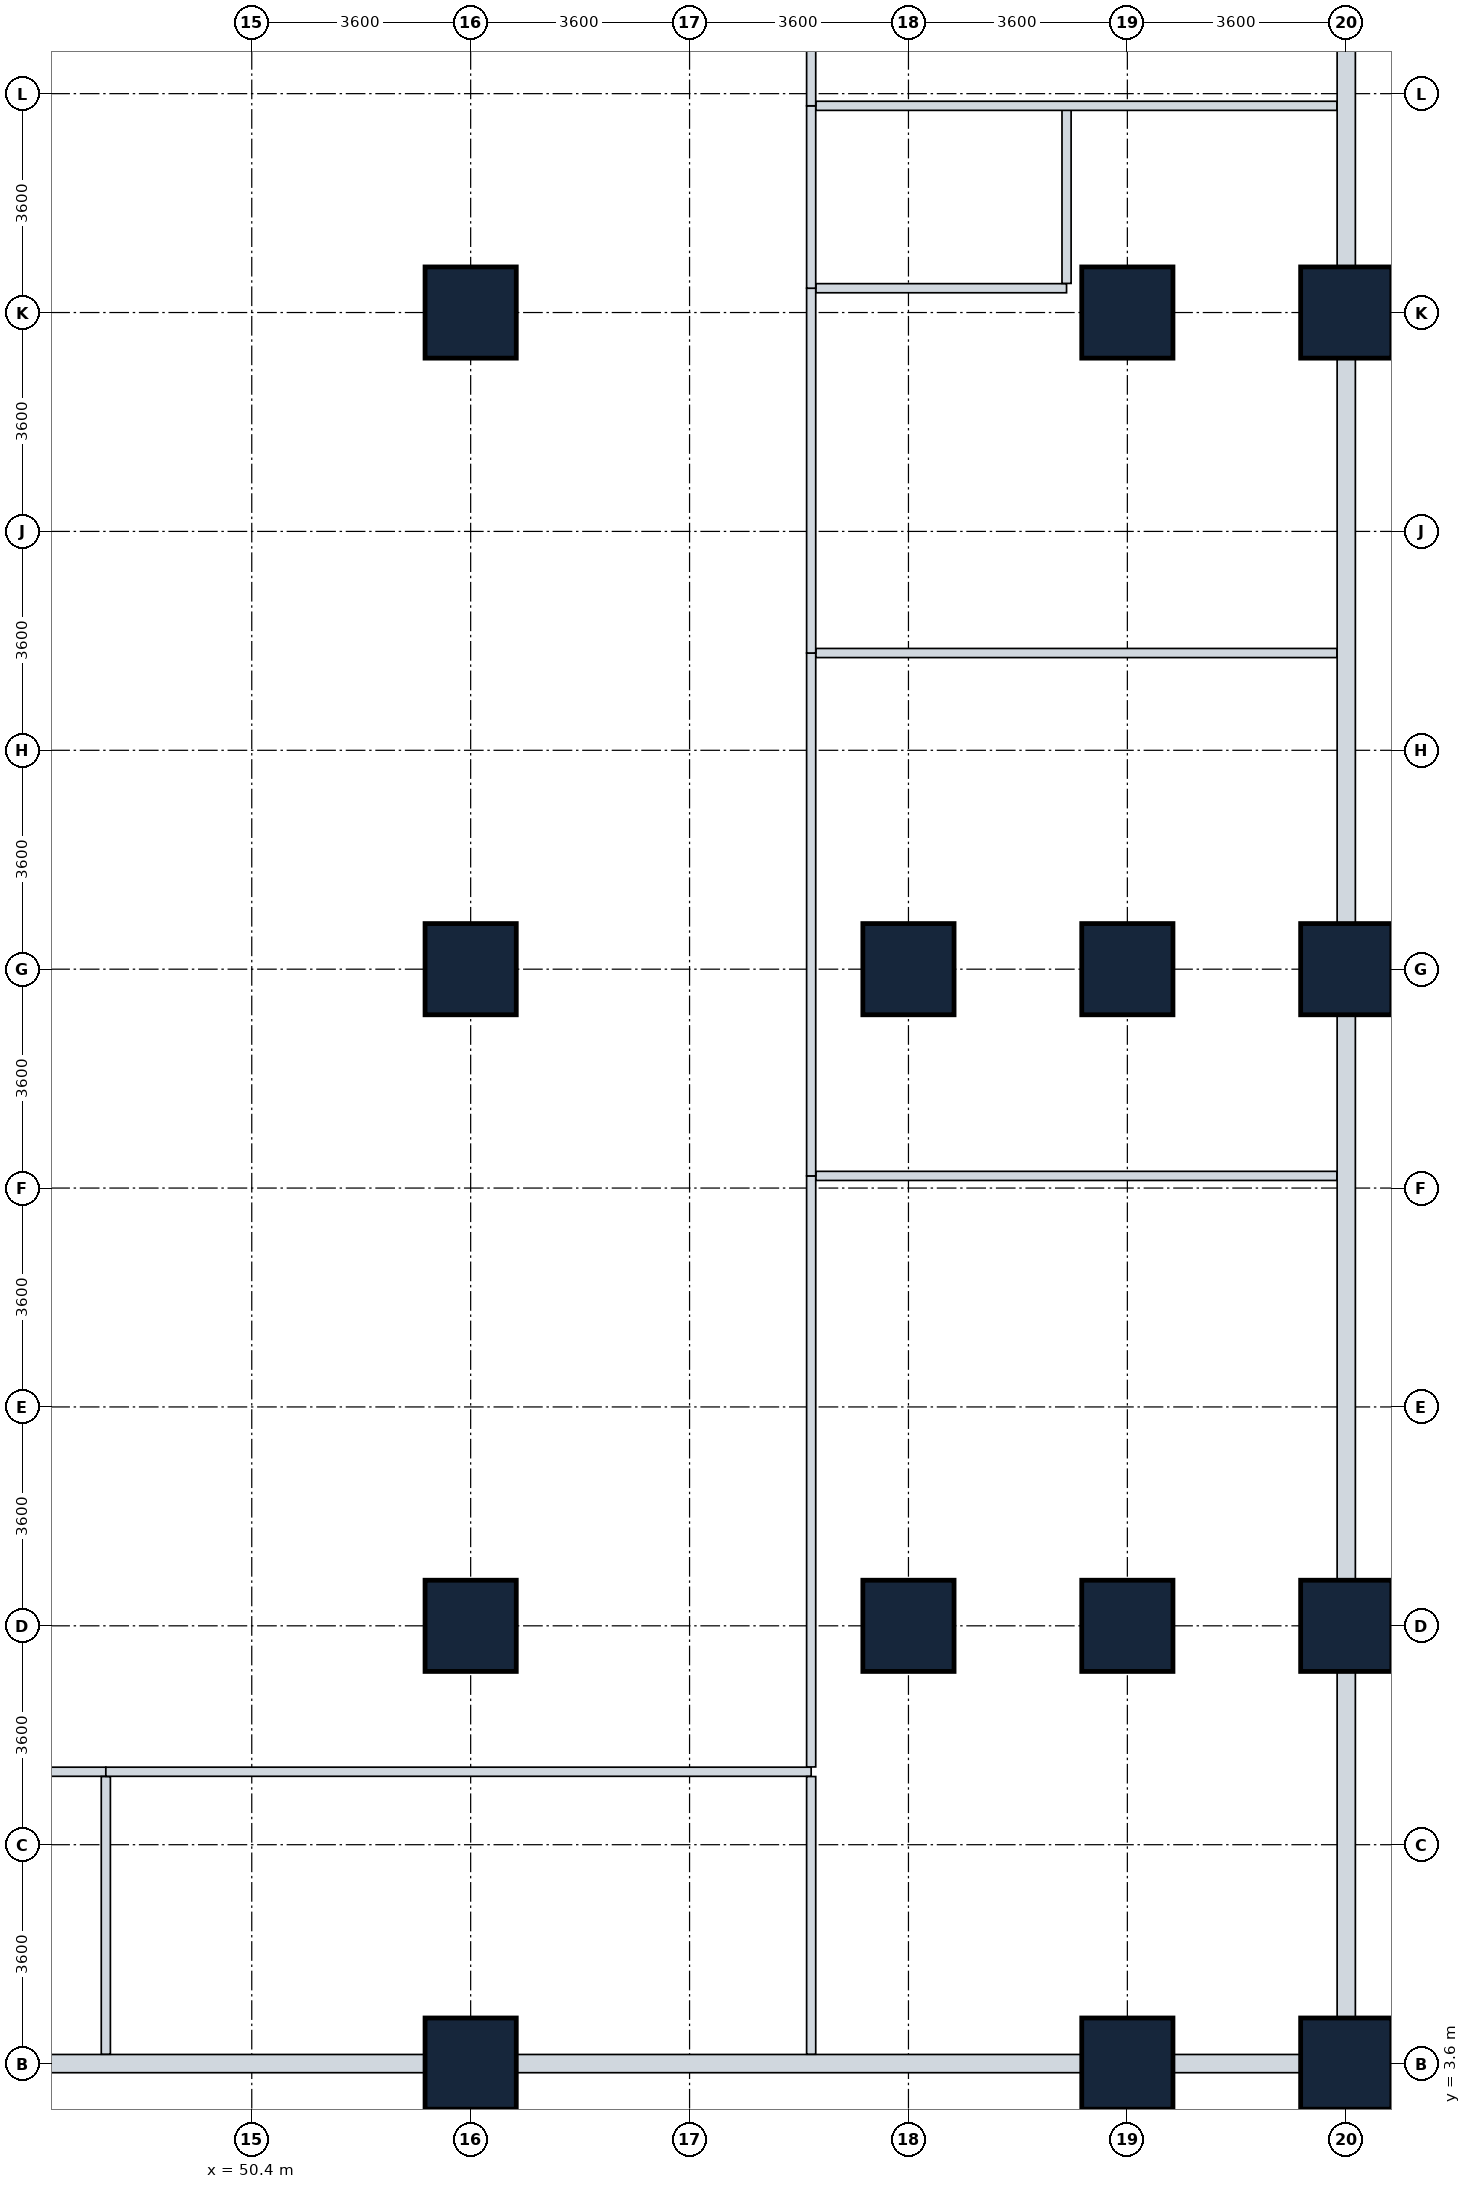
"""IFC4 building model, lengths in metres.
Left out: names, types, materials, properties, quantities, classifications, styles, units other than length and angle.
Written with IfcOpenShell. Run it as: python <this file> out.ifc"""

import sys

from ifc_helpers import new_model, si_unit, direction, frame, frame_2d, origin, origin_2d, place, context, subcontext, project, spatial, rectangle, extrude, element, fill, save


model = new_model("IFC4")
c1 = context("Model", 3, precision=1e-05, world=origin(), true_north=direction((0.0, 1.0)))
c2 = subcontext(c1, "Body", "Model", "MODEL_VIEW")
j1 = project(units=[si_unit("LENGTHUNIT", "METRE"), si_unit("PLANEANGLEUNIT", "RADIAN")], contexts=[c1])
p1 = place(None, origin())
s1 = spatial("IfcSite", under=j1, at=p1, CompositionType="ELEMENT")
p2 = place(p1, origin())
s2 = spatial("IfcBuilding", under=s1, at=p2, CompositionType="ELEMENT")
p3 = place(p2, frame((0.0, 0.0, 19.4)))
s3 = spatial("IfcBuildingStorey", under=s2, at=p3, CompositionType="ELEMENT", Elevation=19.4)
for number, where, z_axis, x_axis in (
    (1, (54.0, 3.6, 0.0), (0.0, 0.0, 1.0), (1.0, 0.0, 0.0)),
    (2, (54.0, 10.8, 0.0), (0.0, 0.0, 1.0), (1.0, 0.0, 0.0)),
    (3, (54.0, 21.6, 0.0), (0.0, 0.0, 1.0), (1.0, 0.0, 0.0)),
    (4, (54.0, 32.4, 0.0), (0.0, 0.0, 1.0), (1.0, 0.0, 0.0)),
    (5, (61.2, 10.8, 0.0), (0.0, 0.0, 1.0), (1.0, 0.0, 0.0)),
    (6, (61.2, 21.6, 0.0), (0.0, 0.0, 1.0), (1.0, 0.0, 0.0)),
    (7, (64.8, 3.6, 0.0), (0.0, 0.0, 1.0), (1.0, 0.0, 0.0)),
    (8, (64.8, 10.8, 0.0), (0.0, 0.0, 1.0), (1.0, 0.0, 0.0)),
    (9, (64.8, 21.6, 0.0), (0.0, 0.0, 1.0), (1.0, 0.0, 0.0)),
    (10, (64.8, 32.4, 0.0), (0.0, 0.0, 1.0), (1.0, 0.0, 0.0)),
    (11, (68.4, 3.6, 0.0), (0.0, 0.0, 1.0), (1.0, 0.0, 0.0)),
    (12, (68.4, 10.8, 0.0), (0.0, 0.0, 1.0), (1.0, 0.0, 0.0)),
    (13, (68.4, 21.6, 0.0), (0.0, 0.0, 1.0), (1.0, 0.0, 0.0)),
    (14, (68.4, 32.4, 0.0), (0.0, 0.0, 1.0), (1.0, 0.0, 0.0)),
):
    element("IfcColumn", number, at=place(p3, frame(where, z_axis=z_axis, x_axis=x_axis)), inside=s3, PredefinedType="COLUMN", context=c2, shape_type="SweptSolid", body=[
        extrude(rectangle(XDim=1.5, YDim=1.5, at=origin_2d()), origin(), (0.0, 0.0, 1.0), 4.6),
    ])
for number, where, z_axis, x_axis in (
    (15, (54.0, 3.6, 0.0), (0.0, 0.0, 1.0), (-1.0, 0.0, 0.0)),
    (16, (64.8, 3.6, 0.0), (0.0, 0.0, 1.0), (-1.0, 0.0, 0.0)),
):
    element("IfcWall", number, at=place(p3, frame(where, z_axis=z_axis, x_axis=x_axis)), inside=s3, PredefinedType="STANDARD", context=c2, shape_type="SweptSolid", body=[
        extrude(rectangle(XDim=10.8, YDim=0.3, at=frame_2d((5.4, 0.0))), origin(), (0.0, 0.0, 1.0), 3.23),
    ])
p4 = place(p3, frame((68.4, 3.6, 0.0), z_axis=(0.0, 0.0, 1.0), x_axis=(-1.0, 0.0, 0.0)))
e17 = element("IfcWall", 17, at=p4, inside=s3, PredefinedType="STANDARD", context=c2, shape_type="SweptSolid", body=[
    extrude(rectangle(XDim=3.6, YDim=0.3, at=frame_2d((1.8, 0.0))), origin(), (0.0, 0.0, 1.0), 3.23),
])
p5 = place(p3, frame((68.4, 10.8, 0.0), z_axis=(0.0, 0.0, 1.0), x_axis=(0.0, -1.0, 0.0)))
e18 = element("IfcWall", 18, at=p5, inside=s3, PredefinedType="STANDARD", context=c2, shape_type="SweptSolid", body=[
    extrude(rectangle(XDim=7.2, YDim=0.3, at=frame_2d((3.6, 0.0))), origin(), (0.0, 0.0, 1.0), 4.185),
])
p6 = place(p5, frame((2.4, 0.0, 0.85)))
e19 = element("IfcOpeningElement", 19, at=p6, cuts=e18, PredefinedType="OPENING", context=c2, shape_type="SweptSolid", body=[
    extrude(rectangle(XDim=2.4, YDim=1.6, at=frame_2d((1.2, 0.8))), frame((0.0, 0.16, 0.0), z_axis=(0.0, -1.0, 0.0), x_axis=(1.0, 0.0, 0.0)), (0.0, 0.0, 1.0), 0.32),
])
p7 = place(p3, frame((68.4, 21.6, 0.0), z_axis=(0.0, 0.0, 1.0), x_axis=(0.0, -1.0, 0.0)))
e20 = element("IfcWall", 20, at=p7, inside=s3, PredefinedType="STANDARD", context=c2, shape_type="SweptSolid", body=[
    extrude(rectangle(XDim=10.8, YDim=0.3, at=frame_2d((5.4, 0.0))), origin(), (0.0, 0.0, 1.0), 4.185),
])
p8 = place(p7, frame((4.6, 0.0, 0.0)))
e21 = element("IfcOpeningElement", 21, at=p8, cuts=e20, PredefinedType="OPENING", context=c2, shape_type="SweptSolid", body=[
    extrude(rectangle(XDim=1.6, YDim=2.1, at=frame_2d((0.8, 1.05))), frame((0.0, 0.16, 0.0), z_axis=(0.0, -1.0, 0.0), x_axis=(1.0, 0.0, 0.0)), (0.0, 0.0, 1.0), 0.32),
])
p9 = place(p3, frame((68.4, 32.4, 0.0), z_axis=(0.0, 0.0, 1.0), x_axis=(0.0, -1.0, 0.0)))
e22 = element("IfcWall", 22, at=p9, inside=s3, PredefinedType="STANDARD", context=c2, shape_type="SweptSolid", body=[
    extrude(rectangle(XDim=10.8, YDim=0.3, at=frame_2d((5.4, 0.0))), origin(), (0.0, 0.0, 1.0), 4.185),
])
p10 = place(p3, frame((68.4, 43.2, 0.0), z_axis=(0.0, 0.0, 1.0), x_axis=(0.0, -1.0, 0.0)))
e23 = element("IfcWall", 23, at=p10, inside=s3, PredefinedType="STANDARD", context=c2, shape_type="SweptSolid", body=[
    extrude(rectangle(XDim=10.8, YDim=0.3, at=frame_2d((5.4, 0.0))), origin(), (0.0, 0.0, 1.0), 4.185),
])
p11 = place(p10, frame((4.2, 0.0, 0.85)))
e24 = element("IfcOpeningElement", 24, at=p11, cuts=e23, PredefinedType="OPENING", context=c2, shape_type="SweptSolid", body=[
    extrude(rectangle(XDim=2.4, YDim=1.6, at=frame_2d((1.2, 0.8))), frame((0.0, 0.16, 0.0), z_axis=(0.0, -1.0, 0.0), x_axis=(1.0, 0.0, 0.0)), (0.0, 0.0, 1.0), 0.32),
])
p12 = place(p3, frame((30.0, 8.4, 0.0), z_axis=(0.0, 0.0, 1.0), x_axis=(1.0, 0.0, 0.0)))
e25 = element("IfcWall", 25, at=p12, inside=s3, PredefinedType="PARTITIONING", context=c2, shape_type="SweptSolid", body=[
    extrude(rectangle(XDim=18.0, YDim=0.15, at=frame_2d((9.0, 0.0))), origin(), (0.0, 0.0, 1.0), 3.23),
])
p13 = place(p12, frame((8.2, 0.0, 0.0)))
e26 = element("IfcOpeningElement", 26, at=p13, cuts=e25, PredefinedType="OPENING", context=c2, shape_type="SweptSolid", body=[
    extrude(rectangle(XDim=1.6, YDim=2.2, at=frame_2d((0.8, 1.1))), frame((0.0, 0.085, 0.0), z_axis=(0.0, -1.0, 0.0), x_axis=(1.0, 0.0, 0.0)), (0.0, 0.0, 1.0), 0.17),
])
p14 = place(p3, frame((48.0, 3.754, 0.0), z_axis=(0.0, 0.0, 1.0), x_axis=(0.0, 1.0, 0.0)))
e27 = element("IfcWall", 27, at=p14, inside=s3, PredefinedType="PARTITIONING", context=c2, shape_type="SweptSolid", body=[
    extrude(rectangle(XDim=4.567, YDim=0.15, at=frame_2d((2.284, 0.0))), origin(), (0.0, 0.0, 1.0), 3.23),
])
p15 = place(p3, frame((48.0, 8.4, 0.0), z_axis=(0.0, 0.0, 1.0), x_axis=(1.0, 0.0, 0.0)))
e28 = element("IfcWall", 28, at=p15, inside=s3, PredefinedType="PARTITIONING", context=c2, shape_type="SweptSolid", body=[
    extrude(rectangle(XDim=11.6, YDim=0.15, at=frame_2d((5.8, 0.0))), origin(), (0.0, 0.0, 1.0), 3.23),
])
p16 = place(p15, frame((2.212, 0.0, 0.0)))
e29 = element("IfcOpeningElement", 29, at=p16, cuts=e28, PredefinedType="OPENING", context=c2, shape_type="SweptSolid", body=[
    extrude(rectangle(XDim=1.6, YDim=2.2, at=frame_2d((0.8, 1.1))), frame((0.0, 0.085, 0.0), z_axis=(0.0, -1.0, 0.0), x_axis=(1.0, 0.0, 0.0)), (0.0, 0.0, 1.0), 0.17),
])
p17 = place(p3, frame((59.6, 3.754, 0.0), z_axis=(0.0, 0.0, 1.0), x_axis=(0.0, 1.0, 0.0)))
e30 = element("IfcWall", 30, at=p17, inside=s3, PredefinedType="PARTITIONING", context=c2, shape_type="SweptSolid", body=[
    extrude(rectangle(XDim=4.567, YDim=0.15, at=frame_2d((2.284, 0.0))), origin(), (0.0, 0.0, 1.0), 3.23),
])
p18 = place(p3, frame((59.6, 8.479, 0.0), z_axis=(0.0, 0.0, 1.0), x_axis=(0.0, 1.0, 0.0)))
e31 = element("IfcWall", 31, at=p18, inside=s3, PredefinedType="PARTITIONING", context=c2, shape_type="SweptSolid", body=[
    extrude(rectangle(XDim=9.721, YDim=0.15, at=frame_2d((4.86, 0.0))), origin(), (0.0, 0.0, 1.0), 3.23),
])
p19 = place(p18, frame((4.941, 0.0, 0.0)))
e32 = element("IfcOpeningElement", 32, at=p19, cuts=e31, PredefinedType="OPENING", context=c2, shape_type="SweptSolid", body=[
    extrude(rectangle(XDim=1.6, YDim=2.2, at=frame_2d((0.8, 1.1))), frame((0.0, 0.085, 0.0), z_axis=(0.0, -1.0, 0.0), x_axis=(1.0, 0.0, 0.0)), (0.0, 0.0, 1.0), 0.17),
])
p20 = place(p3, frame((59.679, 18.2, 0.0), z_axis=(0.0, 0.0, 1.0), x_axis=(1.0, 0.0, 0.0)))
e33 = element("IfcWall", 33, at=p20, inside=s3, PredefinedType="PARTITIONING", context=c2, shape_type="SweptSolid", body=[
    extrude(rectangle(XDim=8.567, YDim=0.15, at=frame_2d((4.284, 0.0))), origin(), (0.0, 0.0, 1.0), 3.23),
])
p21 = place(p3, frame((59.6, 18.2, 0.0), z_axis=(0.0, 0.0, 1.0), x_axis=(0.0, 1.0, 0.0)))
e34 = element("IfcWall", 34, at=p21, inside=s3, PredefinedType="PARTITIONING", context=c2, shape_type="SweptSolid", body=[
    extrude(rectangle(XDim=8.6, YDim=0.15, at=frame_2d((4.3, 0.0))), origin(), (0.0, 0.0, 1.0), 3.23),
])
p22 = place(p21, frame((6.067, 0.0, 0.0)))
e35 = element("IfcOpeningElement", 35, at=p22, cuts=e34, PredefinedType="OPENING", context=c2, shape_type="SweptSolid", body=[
    extrude(rectangle(XDim=1.6, YDim=2.2, at=frame_2d((0.8, 1.1))), frame((0.0, 0.085, 0.0), z_axis=(0.0, -1.0, 0.0), x_axis=(1.0, 0.0, 0.0)), (0.0, 0.0, 1.0), 0.17),
])
p23 = place(p3, frame((59.679, 26.8, 0.0), z_axis=(0.0, 0.0, 1.0), x_axis=(1.0, 0.0, 0.0)))
e36 = element("IfcWall", 36, at=p23, inside=s3, PredefinedType="PARTITIONING", context=c2, shape_type="SweptSolid", body=[
    extrude(rectangle(XDim=8.567, YDim=0.15, at=frame_2d((4.284, 0.0))), origin(), (0.0, 0.0, 1.0), 3.23),
])
p24 = place(p3, frame((59.6, 26.8, 0.0), z_axis=(0.0, 0.0, 1.0), x_axis=(0.0, 1.0, 0.0)))
e37 = element("IfcWall", 37, at=p24, inside=s3, PredefinedType="PARTITIONING", context=c2, shape_type="SweptSolid", body=[
    extrude(rectangle(XDim=6.0, YDim=0.15, at=frame_2d((3.0, 0.0))), origin(), (0.0, 0.0, 1.0), 4.185),
])
p25 = place(p24, frame((2.511, 0.0, 0.0)))
e38 = element("IfcOpeningElement", 38, at=p25, cuts=e37, PredefinedType="OPENING", context=c2, shape_type="SweptSolid", body=[
    extrude(rectangle(XDim=0.9, YDim=2.1, at=frame_2d((0.45, 1.05))), frame((0.0, 0.085, 0.0), z_axis=(0.0, -1.0, 0.0), x_axis=(1.0, 0.0, 0.0)), (0.0, 0.0, 1.0), 0.17),
])
p26 = place(p3, frame((59.679, 32.8, 0.0), z_axis=(0.0, 0.0, 1.0), x_axis=(1.0, 0.0, 0.0)))
e39 = element("IfcWall", 39, at=p26, inside=s3, PredefinedType="PARTITIONING", context=c2, shape_type="SweptSolid", body=[
    extrude(rectangle(XDim=4.121, YDim=0.15, at=frame_2d((2.061, 0.0))), origin(), (0.0, 0.0, 1.0), 4.185),
])
p27 = place(p3, frame((63.8, 32.879, 0.0), z_axis=(0.0, 0.0, 1.0), x_axis=(0.0, 1.0, 0.0)))
e40 = element("IfcWall", 40, at=p27, inside=s3, PredefinedType="PARTITIONING", context=c2, shape_type="SweptSolid", body=[
    extrude(rectangle(XDim=2.921, YDim=0.15, at=frame_2d((1.46, 0.0))), origin(), (0.0, 0.0, 1.0), 4.185),
])
p28 = place(p3, frame((59.6, 32.8, 0.0), z_axis=(0.0, 0.0, 1.0), x_axis=(0.0, 1.0, 0.0)))
e41 = element("IfcWall", 41, at=p28, inside=s3, PredefinedType="PARTITIONING", context=c2, shape_type="SweptSolid", body=[
    extrude(rectangle(XDim=3.0, YDim=0.15, at=frame_2d((1.5, 0.0))), origin(), (0.0, 0.0, 1.0), 4.185),
])
p29 = place(p28, frame((1.0, 0.0, 0.0)))
e42 = element("IfcOpeningElement", 42, at=p29, cuts=e41, PredefinedType="OPENING", context=c2, shape_type="SweptSolid", body=[
    extrude(rectangle(XDim=1.0, YDim=2.1, at=frame_2d((0.5, 1.05))), frame((0.0, 0.085, 0.0), z_axis=(0.0, -1.0, 0.0), x_axis=(1.0, 0.0, 0.0)), (0.0, 0.0, 1.0), 0.17),
])
p30 = place(p3, frame((59.679, 35.8, 0.0), z_axis=(0.0, 0.0, 1.0), x_axis=(1.0, 0.0, 0.0)))
e43 = element("IfcWall", 43, at=p30, inside=s3, PredefinedType="PARTITIONING", context=c2, shape_type="SweptSolid", body=[
    extrude(rectangle(XDim=8.567, YDim=0.15, at=frame_2d((4.284, 0.0))), origin(), (0.0, 0.0, 1.0), 4.185),
])
p31 = place(p3, frame((59.6, 35.8, 0.0), z_axis=(0.0, 0.0, 1.0), x_axis=(0.0, 1.0, 0.0)))
e44 = element("IfcWall", 44, at=p31, inside=s3, PredefinedType="PARTITIONING", context=c2, shape_type="SweptSolid", body=[
    extrude(rectangle(XDim=1.921, YDim=0.15, at=frame_2d((0.96, 0.0))), origin(), (0.0, 0.0, 1.0), 4.185),
])
p32 = place(p31, frame((0.491, 0.0, 0.0)))
e45 = element("IfcOpeningElement", 45, at=p32, cuts=e44, PredefinedType="OPENING", context=c2, shape_type="SweptSolid", body=[
    extrude(rectangle(XDim=1.0, YDim=2.1, at=frame_2d((0.5, 1.05))), frame((0.0, 0.085, 0.0), z_axis=(0.0, -1.0, 0.0), x_axis=(1.0, 0.0, 0.0)), (0.0, 0.0, 1.0), 0.17),
])
p33 = place(p6, origin())
e46 = element("IfcWindow", 46, at=p33, inside=s3, PartitioningType="SINGLE_PANEL", PredefinedType="WINDOW", context=c2, shape_type="SweptSolid", body=[
    extrude(rectangle(XDim=2.4, YDim=1.6, at=frame_2d((1.2, 0.8))), frame((0.0, 0.03, 0.0), z_axis=(0.0, -1.0, 0.0), x_axis=(1.0, 0.0, 0.0)), (0.0, 0.0, 1.0), 0.06),
])
fill(e19, e46)
p34 = place(p8, origin())
e47 = element("IfcDoor", 47, at=p34, inside=s3, OperationType="SINGLE_SWING_LEFT", PredefinedType="DOOR", context=c2, shape_type="SweptSolid", body=[
    extrude(rectangle(XDim=1.6, YDim=2.1, at=frame_2d((0.8, 1.05))), frame((0.0, 0.025, 0.0), z_axis=(0.0, -1.0, 0.0), x_axis=(1.0, 0.0, 0.0)), (0.0, 0.0, 1.0), 0.05),
])
fill(e21, e47)
p35 = place(p11, origin())
e48 = element("IfcWindow", 48, at=p35, inside=s3, PartitioningType="SINGLE_PANEL", PredefinedType="WINDOW", context=c2, shape_type="SweptSolid", body=[
    extrude(rectangle(XDim=2.4, YDim=1.6, at=frame_2d((1.2, 0.8))), frame((0.0, 0.03, 0.0), z_axis=(0.0, -1.0, 0.0), x_axis=(1.0, 0.0, 0.0)), (0.0, 0.0, 1.0), 0.06),
])
fill(e24, e48)
p36 = place(p16, origin())
e49 = element("IfcDoor", 49, at=p36, inside=s3, OperationType="DOUBLE_DOOR_SINGLE_SWING", PredefinedType="DOOR", context=c2, shape_type="SweptSolid", body=[
    extrude(rectangle(XDim=1.6, YDim=2.2, at=frame_2d((0.8, 1.1))), frame((0.0, 0.025, 0.0), z_axis=(0.0, -1.0, 0.0), x_axis=(1.0, 0.0, 0.0)), (0.0, 0.0, 1.0), 0.05),
])
fill(e29, e49)
p37 = place(p19, origin())
e50 = element("IfcDoor", 50, at=p37, inside=s3, OperationType="DOUBLE_DOOR_SINGLE_SWING", PredefinedType="DOOR", context=c2, shape_type="SweptSolid", body=[
    extrude(rectangle(XDim=1.6, YDim=2.2, at=frame_2d((0.8, 1.1))), frame((0.0, 0.025, 0.0), z_axis=(0.0, -1.0, 0.0), x_axis=(1.0, 0.0, 0.0)), (0.0, 0.0, 1.0), 0.05),
])
fill(e32, e50)
p38 = place(p22, origin())
e51 = element("IfcDoor", 51, at=p38, inside=s3, OperationType="DOUBLE_DOOR_SINGLE_SWING", PredefinedType="DOOR", context=c2, shape_type="SweptSolid", body=[
    extrude(rectangle(XDim=1.6, YDim=2.2, at=frame_2d((0.8, 1.1))), frame((0.0, 0.025, 0.0), z_axis=(0.0, -1.0, 0.0), x_axis=(1.0, 0.0, 0.0)), (0.0, 0.0, 1.0), 0.05),
])
fill(e35, e51)
p39 = place(p25, origin())
e52 = element("IfcDoor", 52, at=p39, inside=s3, OperationType="SINGLE_SWING_RIGHT", PredefinedType="DOOR", context=c2, shape_type="SweptSolid", body=[
    extrude(rectangle(XDim=0.9, YDim=2.1, at=frame_2d((0.45, 1.05))), frame((0.0, 0.025, 0.0), z_axis=(0.0, -1.0, 0.0), x_axis=(1.0, 0.0, 0.0)), (0.0, 0.0, 1.0), 0.05),
])
fill(e38, e52)
p40 = place(p29, origin())
e53 = element("IfcDoor", 53, at=p40, inside=s3, OperationType="SINGLE_SWING_RIGHT", PredefinedType="DOOR", context=c2, shape_type="SweptSolid", body=[
    extrude(rectangle(XDim=1.0, YDim=2.1, at=frame_2d((0.5, 1.05))), frame((0.0, 0.025, 0.0), z_axis=(0.0, -1.0, 0.0), x_axis=(1.0, 0.0, 0.0)), (0.0, 0.0, 1.0), 0.05),
])
fill(e42, e53)
p41 = place(p32, origin())
e54 = element("IfcDoor", 54, at=p41, inside=s3, OperationType="SINGLE_SWING_LEFT", PredefinedType="DOOR", context=c2, shape_type="SweptSolid", body=[
    extrude(rectangle(XDim=1.0, YDim=2.1, at=frame_2d((0.5, 1.05))), frame((0.0, 0.025, 0.0), z_axis=(0.0, -1.0, 0.0), x_axis=(1.0, 0.0, 0.0)), (0.0, 0.0, 1.0), 0.05),
])
fill(e45, e54)
save(model, sys.argv[1])
